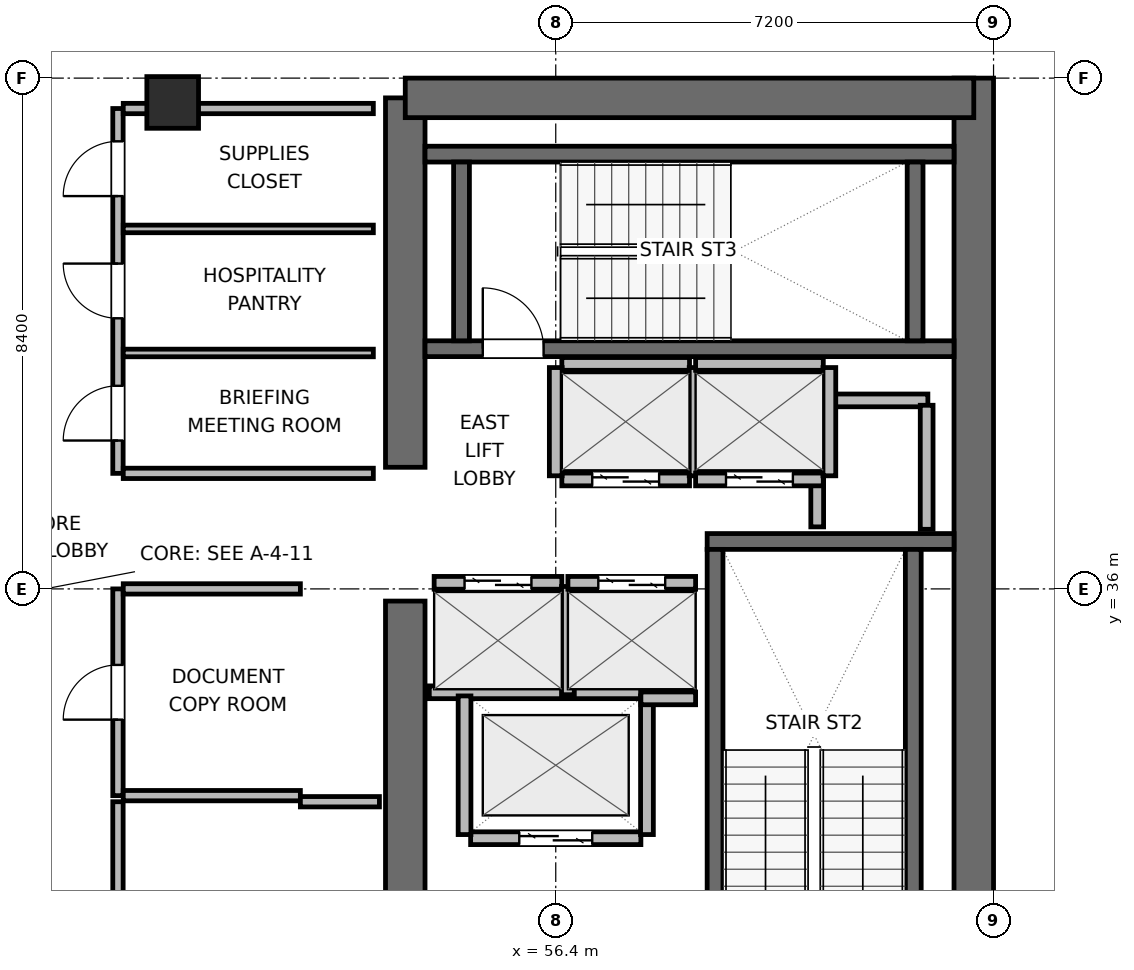
"""IFC4 building model, lengths in metres.
Left out: names, types, materials, properties, quantities, classifications, styles, units other than length and angle.
Written with IfcOpenShell. Run it as: python <this file> out.ifc"""

import sys

from ifc_helpers import new_model, si_unit, direction, frame, frame_2d, origin, origin_2d, place, context, subcontext, project, spatial, rectangle, extrude, element, fill, save


model = new_model("IFC4")
c1 = context("Model", 3, precision=1e-05, world=origin(), true_north=direction((0.0, 1.0)))
c2 = subcontext(c1, "Body", "Model", "MODEL_VIEW")
j1 = project(units=[si_unit("LENGTHUNIT", "METRE"), si_unit("PLANEANGLEUNIT", "RADIAN")], contexts=[c1])
p1 = place(None, origin())
s1 = spatial("IfcSite", under=j1, at=p1, CompositionType="ELEMENT")
p2 = place(p1, origin())
s2 = spatial("IfcBuilding", under=s1, at=p2, CompositionType="ELEMENT")
p3 = place(p2, frame((0.0, 0.0, 247.2)))
s3 = spatial("IfcBuildingStorey", under=s2, at=p3, CompositionType="ELEMENT", Elevation=247.2)
p4 = place(p3, frame((53.925, 27.925, 0.0), z_axis=(0.0, 0.0, 1.0), x_axis=(0.0, 1.0, 0.0)))
e1 = element("IfcWall", 1, at=p4, inside=s3, PredefinedType="SHEAR", context=c2, shape_type="SweptSolid", body=[
    extrude(rectangle(XDim=7.875, YDim=0.65, at=frame_2d((3.938, 0.0))), origin(), (0.0, 0.0, 1.0), 3.9),
])
p5 = place(p3, frame((53.925, 38.0, 0.0), z_axis=(0.0, 0.0, 1.0), x_axis=(0.0, 1.0, 0.0)))
e2 = element("IfcWall", 2, at=p5, inside=s3, PredefinedType="SHEAR", context=c2, shape_type="SweptSolid", body=[
    extrude(rectangle(XDim=6.075, YDim=0.65, at=frame_2d((3.038, 0.0))), origin(), (0.0, 0.0, 1.0), 3.9),
])
p6 = place(p3, frame((63.275, 27.6, 0.0), z_axis=(0.0, 0.0, 1.0), x_axis=(0.0, 1.0, 0.0)))
e3 = element("IfcWall", 3, at=p6, inside=s3, PredefinedType="SHEAR", context=c2, shape_type="SweptSolid", body=[
    extrude(rectangle(XDim=16.8, YDim=0.65, at=frame_2d((8.4, 0.0))), origin(), (0.0, 0.0, 1.0), 3.9),
])
p7 = place(p3, frame((53.925, 44.075, 0.0), z_axis=(0.0, 0.0, 1.0), x_axis=(1.0, 0.0, 0.0)))
e4 = element("IfcWall", 4, at=p7, inside=s3, PredefinedType="SHEAR", context=c2, shape_type="SweptSolid", body=[
    extrude(rectangle(XDim=9.35, YDim=0.65, at=frame_2d((4.675, 0.0))), origin(), (0.0, 0.0, 1.0), 3.9),
])
p8 = place(p3, frame((58.89, 36.78, 0.0), z_axis=(0.0, 0.0, 1.0), x_axis=(1.0, 0.0, 0.0)))
e5 = element("IfcWall", 5, at=p8, inside=s3, PredefinedType="SHEAR", context=c2, shape_type="SweptSolid", body=[
    extrude(rectangle(XDim=4.06, YDim=0.26, at=frame_2d((2.03, 0.0))), origin(), (0.0, 0.0, 1.0), 3.9),
])
p9 = place(p3, frame((59.02, 29.05, 0.0), z_axis=(0.0, 0.0, 1.0), x_axis=(0.0, 1.0, 0.0)))
e6 = element("IfcWall", 6, at=p9, inside=s3, PredefinedType="SHEAR", context=c2, shape_type="SweptSolid", body=[
    extrude(rectangle(XDim=7.6, YDim=0.26, at=frame_2d((3.8, 0.0))), origin(), (0.0, 0.0, 1.0), 3.9),
])
p10 = place(p9, frame((0.3, 0.0, 0.0)))
e7 = element("IfcOpeningElement", 7, at=p10, cuts=e6, PredefinedType="OPENING", context=c2, shape_type="SweptSolid", body=[
    extrude(rectangle(XDim=1.0, YDim=2.04, at=frame_2d((0.5, 1.02))), frame((0.0, 0.14, 0.0), z_axis=(0.0, -1.0, 0.0), x_axis=(1.0, 0.0, 0.0)), (0.0, 0.0, 1.0), 0.28),
])
p11 = place(p3, frame((62.28, 29.05, 0.0), z_axis=(0.0, 0.0, 1.0), x_axis=(0.0, 1.0, 0.0)))
e8 = element("IfcWall", 8, at=p11, inside=s3, PredefinedType="SHEAR", context=c2, shape_type="SweptSolid", body=[
    extrude(rectangle(XDim=7.6, YDim=0.26, at=frame_2d((3.8, 0.0))), origin(), (0.0, 0.0, 1.0), 3.9),
])
p12 = place(p3, frame((54.25, 39.95, 0.0), z_axis=(0.0, 0.0, 1.0), x_axis=(1.0, 0.0, 0.0)))
e9 = element("IfcWall", 9, at=p12, inside=s3, PredefinedType="SHEAR", context=c2, shape_type="SweptSolid", body=[
    extrude(rectangle(XDim=8.7, YDim=0.26, at=frame_2d((4.35, 0.0))), origin(), (0.0, 0.0, 1.0), 3.9),
])
p13 = place(p12, frame((0.95, 0.0, 0.0)))
e10 = element("IfcOpeningElement", 10, at=p13, cuts=e9, PredefinedType="OPENING", context=c2, shape_type="SweptSolid", body=[
    extrude(rectangle(XDim=1.0, YDim=2.04, at=frame_2d((0.5, 1.02))), frame((0.0, 0.14, 0.0), z_axis=(0.0, -1.0, 0.0), x_axis=(1.0, 0.0, 0.0)), (0.0, 0.0, 1.0), 0.28),
])
p14 = place(p3, frame((54.25, 43.15, 0.0), z_axis=(0.0, 0.0, 1.0), x_axis=(1.0, 0.0, 0.0)))
e11 = element("IfcWall", 11, at=p14, inside=s3, PredefinedType="SHEAR", context=c2, shape_type="SweptSolid", body=[
    extrude(rectangle(XDim=8.7, YDim=0.26, at=frame_2d((4.35, 0.0))), origin(), (0.0, 0.0, 1.0), 3.9),
])
for number, where, z_axis, x_axis in (
    (12, (54.85, 40.08, 0.0), (0.0, 0.0, 1.0), (0.0, 1.0, 0.0)),
    (13, (62.31, 40.08, 0.0), (0.0, 0.0, 1.0), (0.0, 1.0, 0.0)),
):
    element("IfcWall", number, at=place(p3, frame(where, z_axis=z_axis, x_axis=x_axis)), inside=s3, PredefinedType="SHEAR", context=c2, shape_type="SweptSolid", body=[
        extrude(rectangle(XDim=2.94, YDim=0.26, at=frame_2d((1.47, 0.0))), origin(), (0.0, 0.0, 1.0), 3.9),
    ])
p15 = place(p3, frame((50.1, 44.0, 0.0), z_axis=(0.0, 0.0, 1.0), x_axis=(1.0, 0.0, 0.0)))
e14 = element("IfcColumn", 14, at=p15, inside=s3, PredefinedType="COLUMN", context=c2, shape_type="SweptSolid", body=[
    extrude(rectangle(XDim=0.85, YDim=0.85, at=origin_2d()), origin(), (0.0, 0.0, 1.0), 3.9),
])
p16 = place(p3, frame((60.72, 39.1, 0.0), z_axis=(0.0, 0.0, 1.0), x_axis=(1.0, 0.0, 0.0)))
e15 = element("IfcWall", 15, at=p16, inside=s3, PredefinedType="PARTITIONING", context=c2, shape_type="SweptSolid", body=[
    extrude(rectangle(XDim=1.8, YDim=0.21, at=frame_2d((0.9, 0.0))), origin(), (0.0, 0.0, 1.0), 3.68),
])
p17 = place(p3, frame((60.7, 37.02, 0.0), z_axis=(0.0, 0.0, 1.0), x_axis=(0.0, 1.0, 0.0)))
e16 = element("IfcWall", 16, at=p17, inside=s3, PredefinedType="PARTITIONING", context=c2, shape_type="SweptSolid", body=[
    extrude(rectangle(XDim=1.96, YDim=0.21, at=frame_2d((0.98, 0.0))), origin(), (0.0, 0.0, 1.0), 3.68),
])
p18 = place(p3, frame((62.5, 36.98, 0.0), z_axis=(0.0, 0.0, 1.0), x_axis=(0.0, 1.0, 0.0)))
e17 = element("IfcWall", 17, at=p18, inside=s3, PredefinedType="PARTITIONING", context=c2, shape_type="SweptSolid", body=[
    extrude(rectangle(XDim=2.04, YDim=0.21, at=frame_2d((1.02, 0.0))), origin(), (0.0, 0.0, 1.0), 3.68),
])
p19 = place(p3, frame((55.0, 31.9, 0.0), z_axis=(0.0, 0.0, 1.0), x_axis=(1.0, 0.0, 0.0)))
e18 = element("IfcWall", 18, at=p19, inside=s3, PredefinedType="PARTITIONING", context=c2, shape_type="SweptSolid", body=[
    extrude(rectangle(XDim=2.8, YDim=0.21, at=frame_2d((1.4, 0.0))), origin(), (0.0, 0.0, 1.0), 3.68),
])
p20 = place(p19, frame((0.8, 0.0, 0.0)))
e19 = element("IfcOpeningElement", 19, at=p20, cuts=e18, PredefinedType="OPENING", context=c2, shape_type="SweptSolid", body=[
    extrude(rectangle(XDim=1.2, YDim=2.04, at=frame_2d((0.6, 1.02))), frame((0.0, 0.115, 0.0), z_axis=(0.0, -1.0, 0.0), x_axis=(1.0, 0.0, 0.0)), (0.0, 0.0, 1.0), 0.23),
])
p21 = place(p3, frame((54.32, 34.3, 0.0), z_axis=(0.0, 0.0, 1.0), x_axis=(1.0, 0.0, 0.0)))
e20 = element("IfcWall", 20, at=p21, inside=s3, PredefinedType="PARTITIONING", context=c2, shape_type="SweptSolid", body=[
    extrude(rectangle(XDim=3.48, YDim=0.21, at=frame_2d((1.74, 0.0))), origin(), (0.0, 0.0, 1.0), 3.68),
])
for number, where, z_axis, x_axis in (
    (21, (54.9, 31.96, 0.0), (0.0, 0.0, 1.0), (0.0, 1.0, 0.0)),
    (22, (57.9, 31.96, 0.0), (0.0, 0.0, 1.0), (0.0, 1.0, 0.0)),
):
    element("IfcWall", number, at=place(p3, frame(where, z_axis=z_axis, x_axis=x_axis)), inside=s3, PredefinedType="PARTITIONING", context=c2, shape_type="SweptSolid", body=[
        extrude(rectangle(XDim=2.28, YDim=0.21, at=frame_2d((1.14, 0.0))), origin(), (0.0, 0.0, 1.0), 3.68),
    ])
p22 = place(p3, frame((54.4, 36.1, 0.0), z_axis=(0.0, 0.0, 1.0), x_axis=(1.0, 0.0, 0.0)))
e23 = element("IfcWall", 23, at=p22, inside=s3, PredefinedType="PARTITIONING", context=c2, shape_type="SweptSolid", body=[
    extrude(rectangle(XDim=2.1, YDim=0.21, at=frame_2d((1.05, 0.0))), origin(), (0.0, 0.0, 1.0), 3.68),
])
p23 = place(p22, frame((0.5, 0.0, 0.0)))
e24 = element("IfcOpeningElement", 24, at=p23, cuts=e23, PredefinedType="OPENING", context=c2, shape_type="SweptSolid", body=[
    extrude(rectangle(XDim=1.1, YDim=2.04, at=frame_2d((0.55, 1.02))), frame((0.0, 0.115, 0.0), z_axis=(0.0, -1.0, 0.0), x_axis=(1.0, 0.0, 0.0)), (0.0, 0.0, 1.0), 0.23),
])
p24 = place(p3, frame((56.6, 34.26, 0.0), z_axis=(0.0, 0.0, 1.0), x_axis=(0.0, 1.0, 0.0)))
e25 = element("IfcWall", 25, at=p24, inside=s3, PredefinedType="PARTITIONING", context=c2, shape_type="SweptSolid", body=[
    extrude(rectangle(XDim=1.78, YDim=0.21, at=frame_2d((0.89, 0.0))), origin(), (0.0, 0.0, 1.0), 3.68),
])
p25 = place(p3, frame((56.6, 36.1, 0.0), z_axis=(0.0, 0.0, 1.0), x_axis=(1.0, 0.0, 0.0)))
e26 = element("IfcWall", 26, at=p25, inside=s3, PredefinedType="PARTITIONING", context=c2, shape_type="SweptSolid", body=[
    extrude(rectangle(XDim=2.1, YDim=0.21, at=frame_2d((1.05, 0.0))), origin(), (0.0, 0.0, 1.0), 3.68),
])
p26 = place(p25, frame((0.5, 0.0, 0.0)))
e27 = element("IfcOpeningElement", 27, at=p26, cuts=e26, PredefinedType="OPENING", context=c2, shape_type="SweptSolid", body=[
    extrude(rectangle(XDim=1.1, YDim=2.04, at=frame_2d((0.55, 1.02))), frame((0.0, 0.115, 0.0), z_axis=(0.0, -1.0, 0.0), x_axis=(1.0, 0.0, 0.0)), (0.0, 0.0, 1.0), 0.23),
])
p27 = place(p3, frame((57.8, 34.2, 0.0), z_axis=(0.0, 0.0, 1.0), x_axis=(1.0, 0.0, 0.0)))
e28 = element("IfcWall", 28, at=p27, inside=s3, PredefinedType="PARTITIONING", context=c2, shape_type="SweptSolid", body=[
    extrude(rectangle(XDim=0.9, YDim=0.21, at=frame_2d((0.45, 0.0))), origin(), (0.0, 0.0, 1.0), 3.68),
])
p28 = place(p3, frame((56.5, 37.8, 0.0), z_axis=(0.0, 0.0, 1.0), x_axis=(1.0, 0.0, 0.0)))
e29 = element("IfcWall", 29, at=p28, inside=s3, PredefinedType="PARTITIONING", context=c2, shape_type="SweptSolid", body=[
    extrude(rectangle(XDim=2.1, YDim=0.21, at=frame_2d((1.05, 0.0))), origin(), (0.0, 0.0, 1.0), 3.68),
])
p29 = place(p28, frame((0.5, 0.0, 0.0)))
e30 = element("IfcOpeningElement", 30, at=p29, cuts=e29, PredefinedType="OPENING", context=c2, shape_type="SweptSolid", body=[
    extrude(rectangle(XDim=1.1, YDim=2.04, at=frame_2d((0.55, 1.02))), frame((0.0, 0.115, 0.0), z_axis=(0.0, -1.0, 0.0), x_axis=(1.0, 0.0, 0.0)), (0.0, 0.0, 1.0), 0.23),
])
p30 = place(p3, frame((56.5, 39.7, 0.0), z_axis=(0.0, 0.0, 1.0), x_axis=(1.0, 0.0, 0.0)))
e31 = element("IfcWall", 31, at=p30, inside=s3, PredefinedType="PARTITIONING", context=c2, shape_type="SweptSolid", body=[
    extrude(rectangle(XDim=2.1, YDim=0.21, at=frame_2d((1.05, 0.0))), origin(), (0.0, 0.0, 1.0), 3.68),
])
for number, where, z_axis, x_axis in (
    (32, (56.4, 37.86, 0.0), (0.0, 0.0, 1.0), (0.0, 1.0, 0.0)),
    (33, (58.7, 37.86, 0.0), (0.0, 0.0, 1.0), (0.0, 1.0, 0.0)),
):
    element("IfcWall", number, at=place(p3, frame(where, z_axis=z_axis, x_axis=x_axis)), inside=s3, PredefinedType="PARTITIONING", context=c2, shape_type="SweptSolid", body=[
        extrude(rectangle(XDim=1.78, YDim=0.21, at=frame_2d((0.89, 0.0))), origin(), (0.0, 0.0, 1.0), 3.68),
    ])
p31 = place(p3, frame((58.7, 37.8, 0.0), z_axis=(0.0, 0.0, 1.0), x_axis=(1.0, 0.0, 0.0)))
e34 = element("IfcWall", 34, at=p31, inside=s3, PredefinedType="PARTITIONING", context=c2, shape_type="SweptSolid", body=[
    extrude(rectangle(XDim=2.1, YDim=0.21, at=frame_2d((1.05, 0.0))), origin(), (0.0, 0.0, 1.0), 3.68),
])
p32 = place(p31, frame((0.5, 0.0, 0.0)))
e35 = element("IfcOpeningElement", 35, at=p32, cuts=e34, PredefinedType="OPENING", context=c2, shape_type="SweptSolid", body=[
    extrude(rectangle(XDim=1.1, YDim=2.04, at=frame_2d((0.55, 1.02))), frame((0.0, 0.115, 0.0), z_axis=(0.0, -1.0, 0.0), x_axis=(1.0, 0.0, 0.0)), (0.0, 0.0, 1.0), 0.23),
])
p33 = place(p3, frame((58.7, 39.7, 0.0), z_axis=(0.0, 0.0, 1.0), x_axis=(1.0, 0.0, 0.0)))
e36 = element("IfcWall", 36, at=p33, inside=s3, PredefinedType="PARTITIONING", context=c2, shape_type="SweptSolid", body=[
    extrude(rectangle(XDim=2.1, YDim=0.21, at=frame_2d((1.05, 0.0))), origin(), (0.0, 0.0, 1.0), 3.68),
])
p34 = place(p3, frame((60.9, 37.86, 0.0), z_axis=(0.0, 0.0, 1.0), x_axis=(0.0, 1.0, 0.0)))
e37 = element("IfcWall", 37, at=p34, inside=s3, PredefinedType="PARTITIONING", context=c2, shape_type="SweptSolid", body=[
    extrude(rectangle(XDim=1.78, YDim=0.21, at=frame_2d((0.89, 0.0))), origin(), (0.0, 0.0, 1.0), 3.68),
])
p35 = place(p3, frame((49.2, 32.6, 0.0), z_axis=(0.0, 0.0, 1.0), x_axis=(0.0, 1.0, 0.0)))
e38 = element("IfcWall", 38, at=p35, inside=s3, PredefinedType="PARTITIONING", context=c2, shape_type="SweptSolid", body=[
    extrude(rectangle(XDim=3.4, YDim=0.17, at=frame_2d((1.7, 0.0))), origin(), (0.0, 0.0, 1.0), 3.68),
])
p36 = place(p35, frame((1.25, 0.0, 0.0)))
e39 = element("IfcOpeningElement", 39, at=p36, cuts=e38, PredefinedType="OPENING", context=c2, shape_type="SweptSolid", body=[
    extrude(rectangle(XDim=0.9, YDim=2.02, at=frame_2d((0.45, 1.01))), frame((0.0, 0.095, 0.0), z_axis=(0.0, -1.0, 0.0), x_axis=(1.0, 0.0, 0.0)), (0.0, 0.0, 1.0), 0.19),
])
for number, where, z_axis, x_axis in (
    (40, (49.287, 32.6, 0.0), (0.0, 0.0, 1.0), (1.0, 0.0, 0.0)),
    (41, (49.287, 36.0, 0.0), (0.0, 0.0, 1.0), (1.0, 0.0, 0.0)),
):
    element("IfcWall", number, at=place(p3, frame(where, z_axis=z_axis, x_axis=x_axis)), inside=s3, PredefinedType="PARTITIONING", context=c2, shape_type="SweptSolid", body=[
        extrude(rectangle(XDim=2.913, YDim=0.17, at=frame_2d((1.457, 0.0))), origin(), (0.0, 0.0, 1.0), 3.68),
    ])
p37 = place(p3, frame((49.2, 28.0, 0.0), z_axis=(0.0, 0.0, 1.0), x_axis=(0.0, 1.0, 0.0)))
e42 = element("IfcWall", 42, at=p37, inside=s3, PredefinedType="PARTITIONING", context=c2, shape_type="SweptSolid", body=[
    extrude(rectangle(XDim=4.5, YDim=0.17, at=frame_2d((2.25, 0.0))), origin(), (0.0, 0.0, 1.0), 3.68),
])
p38 = place(p37, frame((1.8, 0.0, 0.0)))
e43 = element("IfcOpeningElement", 43, at=p38, cuts=e42, PredefinedType="OPENING", context=c2, shape_type="SweptSolid", body=[
    extrude(rectangle(XDim=0.9, YDim=2.02, at=frame_2d((0.45, 1.01))), frame((0.0, 0.095, 0.0), z_axis=(0.0, -1.0, 0.0), x_axis=(1.0, 0.0, 0.0)), (0.0, 0.0, 1.0), 0.19),
])
p39 = place(p3, frame((52.2, 32.5, 0.0), z_axis=(0.0, 0.0, 1.0), x_axis=(1.0, 0.0, 0.0)))
e44 = element("IfcWall", 44, at=p39, inside=s3, PredefinedType="PARTITIONING", context=c2, shape_type="SweptSolid", body=[
    extrude(rectangle(XDim=1.3, YDim=0.17, at=frame_2d((0.65, 0.0))), origin(), (0.0, 0.0, 1.0), 3.68),
])
p40 = place(p3, frame((49.2, 37.9, 0.0), z_axis=(0.0, 0.0, 1.0), x_axis=(0.0, 1.0, 0.0)))
e45 = element("IfcWall", 45, at=p40, inside=s3, PredefinedType="PARTITIONING", context=c2, shape_type="SweptSolid", body=[
    extrude(rectangle(XDim=6.0, YDim=0.17, at=frame_2d((3.0, 0.0))), origin(), (0.0, 0.0, 1.0), 3.68),
])
p41 = place(p40, frame((0.54, 0.0, 0.0)))
e46 = element("IfcOpeningElement", 46, at=p41, cuts=e45, PredefinedType="OPENING", context=c2, shape_type="SweptSolid", body=[
    extrude(rectangle(XDim=0.9, YDim=2.02, at=frame_2d((0.45, 1.01))), frame((0.0, 0.095, 0.0), z_axis=(0.0, -1.0, 0.0), x_axis=(1.0, 0.0, 0.0)), (0.0, 0.0, 1.0), 0.19),
])
p42 = place(p40, frame((2.55, 0.0, 0.0)))
e47 = element("IfcOpeningElement", 47, at=p42, cuts=e45, PredefinedType="OPENING", context=c2, shape_type="SweptSolid", body=[
    extrude(rectangle(XDim=0.9, YDim=2.02, at=frame_2d((0.45, 1.01))), frame((0.0, 0.095, 0.0), z_axis=(0.0, -1.0, 0.0), x_axis=(1.0, 0.0, 0.0)), (0.0, 0.0, 1.0), 0.19),
])
p43 = place(p40, frame((4.56, 0.0, 0.0)))
e48 = element("IfcOpeningElement", 48, at=p43, cuts=e45, PredefinedType="OPENING", context=c2, shape_type="SweptSolid", body=[
    extrude(rectangle(XDim=0.9, YDim=2.02, at=frame_2d((0.45, 1.01))), frame((0.0, 0.095, 0.0), z_axis=(0.0, -1.0, 0.0), x_axis=(1.0, 0.0, 0.0)), (0.0, 0.0, 1.0), 0.19),
])
p44 = place(p3, frame((49.287, 37.9, 0.0), z_axis=(0.0, 0.0, 1.0), x_axis=(1.0, 0.0, 0.0)))
e49 = element("IfcWall", 49, at=p44, inside=s3, PredefinedType="PARTITIONING", context=c2, shape_type="SweptSolid", body=[
    extrude(rectangle(XDim=4.113, YDim=0.17, at=frame_2d((2.056, 0.0))), origin(), (0.0, 0.0, 1.0), 3.68),
])
p45 = place(p3, frame((49.287, 43.9, 0.0), z_axis=(0.0, 0.0, 1.0), x_axis=(1.0, 0.0, 0.0)))
e50 = element("IfcWall", 50, at=p45, inside=s3, PredefinedType="PARTITIONING", context=c2, shape_type="SweptSolid", body=[
    extrude(rectangle(XDim=4.113, YDim=0.17, at=frame_2d((2.056, 0.0))), origin(), (0.0, 0.0, 1.0), 2.765),
])
for number, where, z_axis, x_axis in (
    (51, (49.287, 39.88, 0.0), (0.0, 0.0, 1.0), (1.0, 0.0, 0.0)),
    (52, (49.287, 41.92, 0.0), (0.0, 0.0, 1.0), (1.0, 0.0, 0.0)),
):
    element("IfcWall", number, at=place(p3, frame(where, z_axis=z_axis, x_axis=x_axis)), inside=s3, PredefinedType="PARTITIONING", context=c2, shape_type="SweptSolid", body=[
        extrude(rectangle(XDim=4.113, YDim=0.125, at=frame_2d((2.056, 0.0))), origin(), (0.0, 0.0, 1.0), 3.68),
    ])
p46 = place(p13, origin())
e53 = element("IfcDoor", 53, at=p46, inside=s3, OperationType="SINGLE_SWING_LEFT", PredefinedType="DOOR", context=c2, shape_type="SweptSolid", body=[
    extrude(rectangle(XDim=1.0, YDim=2.04, at=frame_2d((0.5, 1.02))), frame((0.0, 0.025, 0.0), z_axis=(0.0, -1.0, 0.0), x_axis=(1.0, 0.0, 0.0)), (0.0, 0.0, 1.0), 0.05),
])
fill(e10, e53)
p47 = place(p20, origin())
e54 = element("IfcDoor", 54, at=p47, inside=s3, OperationType="DOUBLE_DOOR_SLIDING", PredefinedType="DOOR", context=c2, shape_type="SweptSolid", body=[
    extrude(rectangle(XDim=1.2, YDim=2.04, at=frame_2d((0.6, 1.02))), frame((0.0, 0.025, 0.0), z_axis=(0.0, -1.0, 0.0), x_axis=(1.0, 0.0, 0.0)), (0.0, 0.0, 1.0), 0.05),
])
fill(e19, e54)
p48 = place(p23, origin())
e55 = element("IfcDoor", 55, at=p48, inside=s3, OperationType="DOUBLE_DOOR_SLIDING", PredefinedType="DOOR", context=c2, shape_type="SweptSolid", body=[
    extrude(rectangle(XDim=1.1, YDim=2.04, at=frame_2d((0.55, 1.02))), frame((0.0, 0.025, 0.0), z_axis=(0.0, -1.0, 0.0), x_axis=(1.0, 0.0, 0.0)), (0.0, 0.0, 1.0), 0.05),
])
fill(e24, e55)
p49 = place(p26, origin())
e56 = element("IfcDoor", 56, at=p49, inside=s3, OperationType="DOUBLE_DOOR_SLIDING", PredefinedType="DOOR", context=c2, shape_type="SweptSolid", body=[
    extrude(rectangle(XDim=1.1, YDim=2.04, at=frame_2d((0.55, 1.02))), frame((0.0, 0.025, 0.0), z_axis=(0.0, -1.0, 0.0), x_axis=(1.0, 0.0, 0.0)), (0.0, 0.0, 1.0), 0.05),
])
fill(e27, e56)
p50 = place(p29, origin())
e57 = element("IfcDoor", 57, at=p50, inside=s3, OperationType="DOUBLE_DOOR_SLIDING", PredefinedType="DOOR", context=c2, shape_type="SweptSolid", body=[
    extrude(rectangle(XDim=1.1, YDim=2.04, at=frame_2d((0.55, 1.02))), frame((0.0, 0.025, 0.0), z_axis=(0.0, -1.0, 0.0), x_axis=(1.0, 0.0, 0.0)), (0.0, 0.0, 1.0), 0.05),
])
fill(e30, e57)
p51 = place(p32, origin())
e58 = element("IfcDoor", 58, at=p51, inside=s3, OperationType="DOUBLE_DOOR_SLIDING", PredefinedType="DOOR", context=c2, shape_type="SweptSolid", body=[
    extrude(rectangle(XDim=1.1, YDim=2.04, at=frame_2d((0.55, 1.02))), frame((0.0, 0.025, 0.0), z_axis=(0.0, -1.0, 0.0), x_axis=(1.0, 0.0, 0.0)), (0.0, 0.0, 1.0), 0.05),
])
fill(e35, e58)
p52 = place(p36, origin())
e59 = element("IfcDoor", 59, at=p52, inside=s3, OperationType="SINGLE_SWING_LEFT", PredefinedType="DOOR", context=c2, shape_type="SweptSolid", body=[
    extrude(rectangle(XDim=0.9, YDim=2.02, at=frame_2d((0.45, 1.01))), frame((0.0, 0.025, 0.0), z_axis=(0.0, -1.0, 0.0), x_axis=(1.0, 0.0, 0.0)), (0.0, 0.0, 1.0), 0.05),
])
fill(e39, e59)
p53 = place(p41, origin())
e60 = element("IfcDoor", 60, at=p53, inside=s3, OperationType="SINGLE_SWING_LEFT", PredefinedType="DOOR", context=c2, shape_type="SweptSolid", body=[
    extrude(rectangle(XDim=0.9, YDim=2.02, at=frame_2d((0.45, 1.01))), frame((0.0, 0.025, 0.0), z_axis=(0.0, -1.0, 0.0), x_axis=(1.0, 0.0, 0.0)), (0.0, 0.0, 1.0), 0.05),
])
fill(e46, e60)
p54 = place(p42, origin())
e61 = element("IfcDoor", 61, at=p54, inside=s3, OperationType="SINGLE_SWING_RIGHT", PredefinedType="DOOR", context=c2, shape_type="SweptSolid", body=[
    extrude(rectangle(XDim=0.9, YDim=2.02, at=frame_2d((0.45, 1.01))), frame((0.0, 0.025, 0.0), z_axis=(0.0, -1.0, 0.0), x_axis=(1.0, 0.0, 0.0)), (0.0, 0.0, 1.0), 0.05),
])
fill(e47, e61)
p55 = place(p43, origin())
e62 = element("IfcDoor", 62, at=p55, inside=s3, OperationType="SINGLE_SWING_LEFT", PredefinedType="DOOR", context=c2, shape_type="SweptSolid", body=[
    extrude(rectangle(XDim=0.9, YDim=2.02, at=frame_2d((0.45, 1.01))), frame((0.0, 0.025, 0.0), z_axis=(0.0, -1.0, 0.0), x_axis=(1.0, 0.0, 0.0)), (0.0, 0.0, 1.0), 0.05),
])
fill(e48, e62)
save(model, sys.argv[1])
